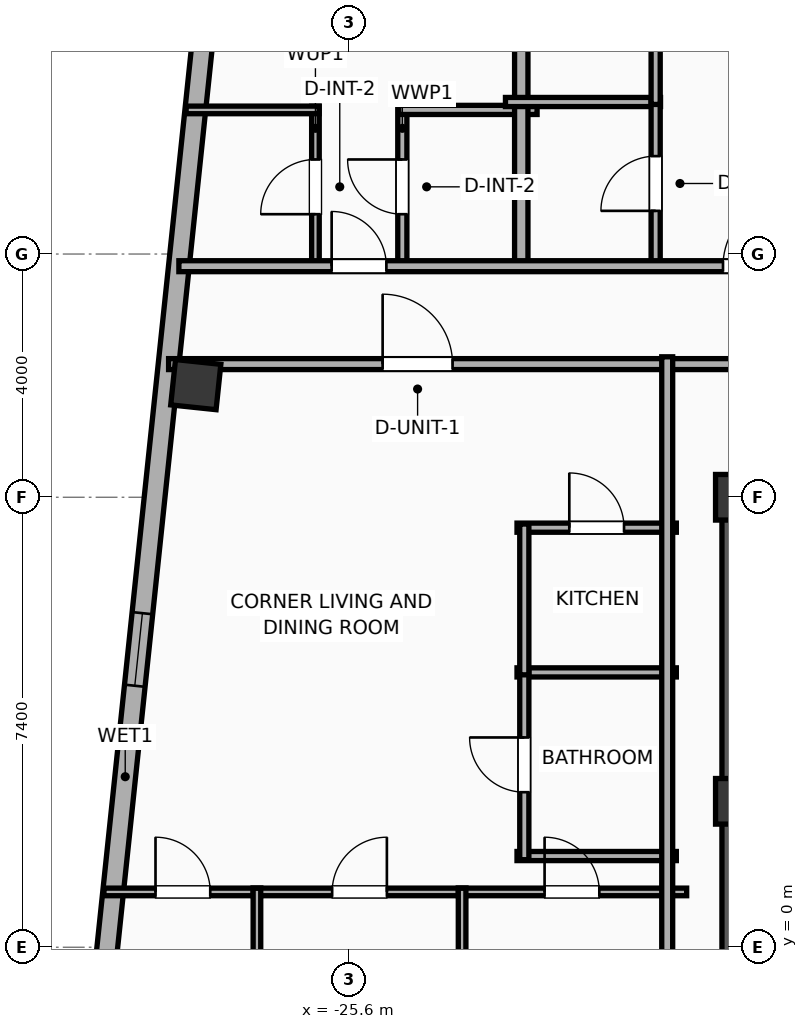
"""IFC4 building model, lengths in metres.
Left out: names, types, materials, properties, quantities, classifications, styles, units other than length and angle.
Written with IfcOpenShell. Run it as: python <this file> out.ifc"""

import sys

from ifc_helpers import new_model, si_unit, direction, frame, frame_2d, origin, origin_2d, place, context, subcontext, project, spatial, rectangle, hollow_rectangle, extrude, element, fill, save


model = new_model("IFC4")
c1 = context("Model", 3, precision=1e-05, world=origin(), true_north=direction((0.0, 1.0)))
c2 = subcontext(c1, "Body", "Model", "MODEL_VIEW")
j1 = project(units=[si_unit("LENGTHUNIT", "METRE"), si_unit("PLANEANGLEUNIT", "RADIAN")], contexts=[c1])
p1 = place(None, origin())
s1 = spatial("IfcSite", under=j1, at=p1, CompositionType="ELEMENT")
p2 = place(p1, origin())
s2 = spatial("IfcBuilding", under=s1, at=p2, CompositionType="ELEMENT")
p3 = place(p2, frame((0.0, 0.0, 287.3)))
s3 = spatial("IfcBuildingStorey", under=s2, at=p3, CompositionType="ELEMENT", Elevation=287.3)
for number, where, z_axis, x_axis in (
    (1, (-19.2, 2.4, 0.0), (0.0, 0.0, 1.0), (1.0, 0.0, 0.0)),
    (2, (-19.2, 7.4, 0.0), (0.0, 0.0, 1.0), (1.0, 0.0, 0.0)),
):
    element("IfcColumn", number, at=place(p3, frame(where, z_axis=z_axis, x_axis=x_axis)), inside=s3, PredefinedType="COLUMN", context=c2, shape_type="SweptSolid", body=[
        extrude(rectangle(XDim=0.75, YDim=0.75, at=origin_2d()), origin(), (0.0, 0.0, 1.0), 3.9),
    ])
p4 = place(p3, frame((-19.425, 7.4, 0.0), z_axis=(0.0, 0.0, 1.0), x_axis=(1.0, 0.0, 0.0)))
e3 = element("IfcWall", 3, at=p4, inside=s3, PredefinedType="SHEAR", context=c2, shape_type="SweptSolid", body=[
    extrude(rectangle(XDim=7.25, YDim=0.45, at=frame_2d((3.625, 0.0))), origin(), (0.0, 0.0, 1.0), 3.635),
])
p5 = place(p3, frame((-19.145, -7.4, 0.0), z_axis=(0.0, 0.0, 1.0), x_axis=(0.0, 1.0, 0.0)))
e4 = element("IfcWall", 4, at=p5, inside=s3, PredefinedType="SHEAR", context=c2, shape_type="SweptSolid", body=[
    extrude(rectangle(XDim=14.8, YDim=0.65, at=frame_2d((7.4, 0.0))), origin(), (0.0, 0.0, 1.0), 3.635),
])
p6 = place(p3, frame((-28.123, 9.252, 0.0), z_axis=(0.0, 0.0, 1.0), x_axis=(0.994521895368, -0.104528463268, 0.0)))
e5 = element("IfcColumn", 5, at=p6, inside=s3, PredefinedType="COLUMN", context=c2, shape_type="SweptSolid", body=[
    extrude(hollow_rectangle(XDim=0.75, YDim=0.75, WallThickness=0.025, at=origin_2d()), origin(), (0.0, 0.0, 1.0), 3.9),
])
p7 = place(p3, frame((-30.87, -12.296, 0.0), z_axis=(0.0, 0.0, 1.0), x_axis=(0.104533282919, 0.994521388791, 0.0)))
e6 = element("IfcWall", 6, at=p7, inside=s3, PredefinedType="ELEMENTEDWALL", context=c2, shape_type="SweptSolid", body=[
    extrude(rectangle(XDim=30.366, YDim=0.34, at=frame_2d((15.183, 0.0))), origin(), (0.0, 0.0, 1.0), 3.635),
])
p8 = place(p7, frame((5.842, 0.0, 0.75)))
e7 = element("IfcOpeningElement", 7, at=p8, cuts=e6, PredefinedType="OPENING", context=c2, shape_type="SweptSolid", body=[
    extrude(rectangle(XDim=1.8, YDim=2.1, at=frame_2d((0.9, 1.05))), frame((0.0, 0.18, 0.0), z_axis=(0.0, -1.0, 0.0), x_axis=(1.0, 0.0, 0.0)), (0.0, 0.0, 1.0), 0.36),
])
p9 = place(p7, frame((27.238, 0.0, 0.75)))
e8 = element("IfcOpeningElement", 8, at=p9, cuts=e6, PredefinedType="OPENING", context=c2, shape_type="SweptSolid", body=[
    extrude(rectangle(XDim=1.2, YDim=2.05, at=frame_2d((0.6, 1.025))), frame((0.0, 0.18, 0.0), z_axis=(0.0, -1.0, 0.0), x_axis=(1.0, 0.0, 0.0)), (0.0, 0.0, 1.0), 0.36),
])
p10 = place(p7, frame((16.688, 0.0, 0.75)))
e9 = element("IfcOpeningElement", 9, at=p10, cuts=e6, PredefinedType="OPENING", context=c2, shape_type="SweptSolid", body=[
    extrude(rectangle(XDim=1.2, YDim=2.05, at=frame_2d((0.6, 1.025))), frame((0.0, 0.18, 0.0), z_axis=(0.0, -1.0, 0.0), x_axis=(1.0, 0.0, 0.0)), (0.0, 0.0, 1.0), 0.36),
])
p11 = place(p3, frame((-28.57, 9.59, 0.0), z_axis=(0.0, 0.0, 1.0), x_axis=(1.0, 0.0, 0.0)))
e10 = element("IfcWall", 10, at=p11, inside=s3, PredefinedType="PARTITIONING", context=c2, shape_type="SweptSolid", body=[
    extrude(rectangle(XDim=18.69, YDim=0.18, at=frame_2d((9.345, 0.0))), origin(), (0.0, 0.0, 1.0), 3.635),
])
p12 = place(p11, frame((3.52, 0.0, 0.0)))
e11 = element("IfcOpeningElement", 11, at=p12, cuts=e10, PredefinedType="OPENING", context=c2, shape_type="SweptSolid", body=[
    extrude(rectangle(XDim=1.15, YDim=2.05, at=frame_2d((0.575, 1.025))), frame((0.0, 0.1, 0.0), z_axis=(0.0, -1.0, 0.0), x_axis=(1.0, 0.0, 0.0)), (0.0, 0.0, 1.0), 0.2),
])
p13 = place(p3, frame((-26.155, 11.18, 0.0), z_axis=(0.0, 0.0, 1.0), x_axis=(0.0, 1.0, 0.0)))
e12 = element("IfcWall", 12, at=p13, inside=s3, PredefinedType="PARTITIONING", context=c2, shape_type="SweptSolid", body=[
    extrude(rectangle(XDim=2.65, YDim=0.125, at=frame_2d((1.325, 0.0))), origin(), (0.0, 0.0, 1.0), 3.635),
])
p14 = place(p13, frame((0.875, 0.0, 0.0)))
e13 = element("IfcOpeningElement", 13, at=p14, cuts=e12, PredefinedType="OPENING", context=c2, shape_type="SweptSolid", body=[
    extrude(rectangle(XDim=0.9, YDim=2.05, at=frame_2d((0.45, 1.025))), frame((0.0, 0.073, 0.0), z_axis=(0.0, -1.0, 0.0), x_axis=(1.0, 0.0, 0.0)), (0.0, 0.0, 1.0), 0.145),
])
p15 = place(p3, frame((-24.726, 11.18, 0.0), z_axis=(0.0, 0.0, 1.0), x_axis=(0.0, 1.0, 0.0)))
e14 = element("IfcWall", 14, at=p15, inside=s3, PredefinedType="PLUMBINGWALL", context=c2, shape_type="SweptSolid", body=[
    extrude(rectangle(XDim=2.65, YDim=0.15, at=frame_2d((1.325, 0.0))), origin(), (0.0, 0.0, 1.0), 3.635),
])
p16 = place(p15, frame((0.875, 0.0, 0.0)))
e15 = element("IfcOpeningElement", 15, at=p16, cuts=e14, PredefinedType="OPENING", context=c2, shape_type="SweptSolid", body=[
    extrude(rectangle(XDim=0.9, YDim=2.05, at=frame_2d((0.45, 1.025))), frame((0.0, 0.085, 0.0), z_axis=(0.0, -1.0, 0.0), x_axis=(1.0, 0.0, 0.0)), (0.0, 0.0, 1.0), 0.17),
])
p17 = place(p3, frame((-28.281, 13.77, 0.0), z_axis=(0.0, 0.0, 1.0), x_axis=(1.0, 0.0, 0.0)))
e16 = element("IfcWall", 16, at=p17, inside=s3, PredefinedType="PARTITIONING", context=c2, shape_type="SweptSolid", body=[
    extrude(rectangle(XDim=2.186, YDim=0.125, at=frame_2d((1.093, 0.0))), origin(), (0.0, 0.0, 1.0), 3.635),
])
p18 = place(p3, frame((-24.786, 13.77, 0.0), z_axis=(0.0, 0.0, 1.0), x_axis=(1.0, 0.0, 0.0)))
e17 = element("IfcWall", 17, at=p18, inside=s3, PredefinedType="PLUMBINGWALL", context=c2, shape_type="SweptSolid", body=[
    extrude(rectangle(XDim=2.276, YDim=0.15, at=frame_2d((1.138, 0.0))), origin(), (0.0, 0.0, 1.0), 3.635),
])
p19 = place(p3, frame((-22.77, 11.12, 0.0), z_axis=(0.0, 0.0, 1.0), x_axis=(0.0, 1.0, 0.0)))
e18 = element("IfcWall", 18, at=p19, inside=s3, PredefinedType="PARTITIONING", context=c2, shape_type="SweptSolid", body=[
    extrude(rectangle(XDim=9.732, YDim=0.22, at=frame_2d((4.866, 0.0))), origin(), (0.0, 0.0, 1.0), 3.075),
])
p20 = place(p3, frame((-23.03, 13.9, 0.0), z_axis=(0.0, 0.0, 1.0), x_axis=(1.0, 0.0, 0.0)))
e19 = element("IfcWall", 19, at=p20, inside=s3, PredefinedType="PLUMBINGWALL", context=c2, shape_type="SweptSolid", body=[
    extrude(rectangle(XDim=2.55, YDim=0.15, at=frame_2d((1.275, 0.0))), origin(), (0.0, 0.0, 1.0), 3.635),
])
p21 = place(p3, frame((-20.56, 11.18, 0.0), z_axis=(0.0, 0.0, 1.0), x_axis=(0.0, 1.0, 0.0)))
e20 = element("IfcWall", 20, at=p21, inside=s3, PredefinedType="PLUMBINGWALL", context=c2, shape_type="SweptSolid", body=[
    extrude(rectangle(XDim=2.76, YDim=0.15, at=frame_2d((1.38, 0.0))), origin(), (0.0, 0.0, 1.0), 3.075),
])
p22 = place(p21, frame((0.93, 0.0, 0.0)))
e21 = element("IfcOpeningElement", 21, at=p22, cuts=e20, PredefinedType="OPENING", context=c2, shape_type="SweptSolid", body=[
    extrude(rectangle(XDim=0.9, YDim=2.05, at=frame_2d((0.45, 1.025))), frame((0.0, 0.085, 0.0), z_axis=(0.0, -1.0, 0.0), x_axis=(1.0, 0.0, 0.0)), (0.0, 0.0, 1.0), 0.17),
])
p23 = place(p3, frame((-20.56, 13.86, 0.0), z_axis=(0.0, 0.0, 1.0), x_axis=(0.0, 1.0, 0.0)))
e22 = element("IfcWall", 22, at=p23, inside=s3, PredefinedType="PLUMBINGWALL", context=c2, shape_type="SweptSolid", body=[
    extrude(rectangle(XDim=6.911, YDim=0.15, at=frame_2d((3.456, 0.0))), origin(), (0.0, 0.0, 1.0), 3.635),
])
p24 = place(p23, frame((3.006, 0.0, 0.0)))
e23 = element("IfcOpeningElement", 23, at=p24, cuts=e22, PredefinedType="OPENING", context=c2, shape_type="SweptSolid", body=[
    extrude(rectangle(XDim=0.9, YDim=2.05, at=frame_2d((0.45, 1.025))), frame((0.0, 0.085, 0.0), z_axis=(0.0, -1.0, 0.0), x_axis=(1.0, 0.0, 0.0)), (0.0, 0.0, 1.0), 0.17),
])
p25 = place(p3, frame((-28.401, 11.2, 0.0), z_axis=(0.0, 0.0, 1.0), x_axis=(1.0, 0.0, 0.0)))
e24 = element("IfcWall", 24, at=p25, inside=s3, PredefinedType="PARTITIONING", context=c2, shape_type="SweptSolid", body=[
    extrude(rectangle(XDim=53.956, YDim=0.18, at=frame_2d((26.978, 0.0))), origin(), (0.0, 0.0, 1.0), 3.635),
])
p26 = place(p25, frame((2.512, 0.0, 0.0)))
e25 = element("IfcOpeningElement", 25, at=p26, cuts=e24, PredefinedType="OPENING", context=c2, shape_type="SweptSolid", body=[
    extrude(rectangle(XDim=0.9, YDim=2.05, at=frame_2d((0.45, 1.025))), frame((0.0, 0.1, 0.0), z_axis=(0.0, -1.0, 0.0), x_axis=(1.0, 0.0, 0.0)), (0.0, 0.0, 1.0), 0.2),
])
p27 = place(p25, frame((8.948, 0.0, 0.0)))
e26 = element("IfcOpeningElement", 26, at=p27, cuts=e24, PredefinedType="OPENING", context=c2, shape_type="SweptSolid", body=[
    extrude(rectangle(XDim=1.15, YDim=2.05, at=frame_2d((0.575, 1.025))), frame((0.0, 0.1, 0.0), z_axis=(0.0, -1.0, 0.0), x_axis=(1.0, 0.0, 0.0)), (0.0, 0.0, 1.0), 0.2),
])
p28 = place(p25, frame((13.821, 0.0, 0.0)))
e27 = element("IfcOpeningElement", 27, at=p28, cuts=e24, PredefinedType="OPENING", context=c2, shape_type="SweptSolid", body=[
    extrude(rectangle(XDim=0.9, YDim=2.05, at=frame_2d((0.45, 1.025))), frame((0.0, 0.1, 0.0), z_axis=(0.0, -1.0, 0.0), x_axis=(1.0, 0.0, 0.0)), (0.0, 0.0, 1.0), 0.2),
])
p29 = place(p25, frame((20.818, 0.0, 0.0)))
e28 = element("IfcOpeningElement", 28, at=p29, cuts=e24, PredefinedType="OPENING", context=c2, shape_type="SweptSolid", body=[
    extrude(rectangle(XDim=1.15, YDim=2.05, at=frame_2d((0.575, 1.025))), frame((0.0, 0.1, 0.0), z_axis=(0.0, -1.0, 0.0), x_axis=(1.0, 0.0, 0.0)), (0.0, 0.0, 1.0), 0.2),
])
p30 = place(p25, frame((27.212, 0.0, 0.0)))
e29 = element("IfcOpeningElement", 29, at=p30, cuts=e24, PredefinedType="OPENING", context=c2, shape_type="SweptSolid", body=[
    extrude(rectangle(XDim=1.15, YDim=2.05, at=frame_2d((0.575, 1.025))), frame((0.0, 0.1, 0.0), z_axis=(0.0, -1.0, 0.0), x_axis=(1.0, 0.0, 0.0)), (0.0, 0.0, 1.0), 0.2),
])
p31 = place(p25, frame((32.576, 0.0, 0.0)))
e30 = element("IfcOpeningElement", 30, at=p31, cuts=e24, PredefinedType="OPENING", context=c2, shape_type="SweptSolid", body=[
    extrude(rectangle(XDim=0.9, YDim=2.05, at=frame_2d((0.45, 1.025))), frame((0.0, 0.1, 0.0), z_axis=(0.0, -1.0, 0.0), x_axis=(1.0, 0.0, 0.0)), (0.0, 0.0, 1.0), 0.2),
])
p32 = place(p25, frame((38.576, 0.0, 0.0)))
e31 = element("IfcOpeningElement", 31, at=p32, cuts=e24, PredefinedType="OPENING", context=c2, shape_type="SweptSolid", body=[
    extrude(rectangle(XDim=0.9, YDim=2.05, at=frame_2d((0.45, 1.025))), frame((0.0, 0.1, 0.0), z_axis=(0.0, -1.0, 0.0), x_axis=(1.0, 0.0, 0.0)), (0.0, 0.0, 1.0), 0.2),
])
p33 = place(p25, frame((43.102, 0.0, 0.0)))
e32 = element("IfcOpeningElement", 32, at=p33, cuts=e24, PredefinedType="OPENING", context=c2, shape_type="SweptSolid", body=[
    extrude(rectangle(XDim=1.15, YDim=2.05, at=frame_2d((0.575, 1.025))), frame((0.0, 0.1, 0.0), z_axis=(0.0, -1.0, 0.0), x_axis=(1.0, 0.0, 0.0)), (0.0, 0.0, 1.0), 0.2),
])
p34 = place(p25, frame((50.732, 0.0, 0.0)))
e33 = element("IfcOpeningElement", 33, at=p34, cuts=e24, PredefinedType="OPENING", context=c2, shape_type="SweptSolid", body=[
    extrude(rectangle(XDim=0.9, YDim=2.05, at=frame_2d((0.45, 1.025))), frame((0.0, 0.1, 0.0), z_axis=(0.0, -1.0, 0.0), x_axis=(1.0, 0.0, 0.0)), (0.0, 0.0, 1.0), 0.2),
])
p35 = place(p3, frame((-22.84, 6.9, 0.0), z_axis=(0.0, 0.0, 1.0), x_axis=(1.0, 0.0, 0.0)))
e34 = element("IfcWall", 34, at=p35, inside=s3, PredefinedType="PLUMBINGWALL", context=c2, shape_type="SweptSolid", body=[
    extrude(rectangle(XDim=2.62, YDim=0.15, at=frame_2d((1.31, 0.0))), origin(), (0.0, 0.0, 1.0), 3.635),
])
p36 = place(p35, frame((0.86, 0.0, 0.0)))
e35 = element("IfcOpeningElement", 35, at=p36, cuts=e34, PredefinedType="OPENING", context=c2, shape_type="SweptSolid", body=[
    extrude(rectangle(XDim=0.9, YDim=2.05, at=frame_2d((0.45, 1.025))), frame((0.0, 0.085, 0.0), z_axis=(0.0, -1.0, 0.0), x_axis=(1.0, 0.0, 0.0)), (0.0, 0.0, 1.0), 0.17),
])
for number, where, z_axis, x_axis in (
    (36, (-22.84, 4.52, 0.0), (0.0, 0.0, 1.0), (1.0, 0.0, 0.0)),
    (37, (-22.84, 1.5, 0.0), (0.0, 0.0, 1.0), (1.0, 0.0, 0.0)),
):
    element("IfcWall", number, at=place(p3, frame(where, z_axis=z_axis, x_axis=x_axis)), inside=s3, PredefinedType="PLUMBINGWALL", context=c2, shape_type="SweptSolid", body=[
        extrude(rectangle(XDim=2.62, YDim=0.15, at=frame_2d((1.31, 0.0))), origin(), (0.0, 0.0, 1.0), 3.635),
    ])
p37 = place(p3, frame((-22.72, 1.44, 0.0), z_axis=(0.0, 0.0, 1.0), x_axis=(0.0, 1.0, 0.0)))
e38 = element("IfcWall", 38, at=p37, inside=s3, PredefinedType="PLUMBINGWALL", context=c2, shape_type="SweptSolid", body=[
    extrude(rectangle(XDim=3.12, YDim=0.15, at=frame_2d((1.56, 0.0))), origin(), (0.0, 0.0, 1.0), 3.635),
])
p38 = place(p37, frame((1.11, 0.0, 0.0)))
e39 = element("IfcOpeningElement", 39, at=p38, cuts=e38, PredefinedType="OPENING", context=c2, shape_type="SweptSolid", body=[
    extrude(rectangle(XDim=0.9, YDim=2.05, at=frame_2d((0.45, 1.025))), frame((0.0, 0.085, 0.0), z_axis=(0.0, -1.0, 0.0), x_axis=(1.0, 0.0, 0.0)), (0.0, 0.0, 1.0), 0.17),
])
p39 = place(p3, frame((-22.72, 4.48, 0.0), z_axis=(0.0, 0.0, 1.0), x_axis=(0.0, 1.0, 0.0)))
e40 = element("IfcWall", 40, at=p39, inside=s3, PredefinedType="PLUMBINGWALL", context=c2, shape_type="SweptSolid", body=[
    extrude(rectangle(XDim=2.48, YDim=0.15, at=frame_2d((1.24, 0.0))), origin(), (0.0, 0.0, 1.0), 3.635),
])
p40 = place(p3, frame((-29.633, 0.91, 0.0), z_axis=(0.0, 0.0, 1.0), x_axis=(1.0, 0.0, 0.0)))
e41 = element("IfcWall", 41, at=p40, inside=s3, PredefinedType="PARTITIONING", context=c2, shape_type="SweptSolid", body=[
    extrude(rectangle(XDim=2.579, YDim=0.125, at=frame_2d((1.289, 0.0))), origin(), (0.0, 0.0, 1.0), 3.635),
])
p41 = place(p40, frame((0.848, 0.0, 0.0)))
e42 = element("IfcOpeningElement", 42, at=p41, cuts=e41, PredefinedType="OPENING", context=c2, shape_type="SweptSolid", body=[
    extrude(rectangle(XDim=0.9, YDim=2.05, at=frame_2d((0.45, 1.025))), frame((0.0, 0.073, 0.0), z_axis=(0.0, -1.0, 0.0), x_axis=(1.0, 0.0, 0.0)), (0.0, 0.0, 1.0), 0.145),
])
p42 = place(p3, frame((-27.179, 0.91, 0.0), z_axis=(0.0, 0.0, 1.0), x_axis=(1.0, 0.0, 0.0)))
e43 = element("IfcWall", 43, at=p42, inside=s3, PredefinedType="PARTITIONING", context=c2, shape_type="SweptSolid", body=[
    extrude(rectangle(XDim=3.499, YDim=0.125, at=frame_2d((1.75, 0.0))), origin(), (0.0, 0.0, 1.0), 3.635),
])
p43 = place(p42, frame((1.3, 0.0, 0.0)))
e44 = element("IfcOpeningElement", 44, at=p43, cuts=e43, PredefinedType="OPENING", context=c2, shape_type="SweptSolid", body=[
    extrude(rectangle(XDim=0.9, YDim=2.05, at=frame_2d((0.45, 1.025))), frame((0.0, 0.073, 0.0), z_axis=(0.0, -1.0, 0.0), x_axis=(1.0, 0.0, 0.0)), (0.0, 0.0, 1.0), 0.145),
])
p44 = place(p3, frame((-23.805, 0.91, 0.0), z_axis=(0.0, 0.0, 1.0), x_axis=(1.0, 0.0, 0.0)))
e45 = element("IfcWall", 45, at=p44, inside=s3, PredefinedType="PARTITIONING", context=c2, shape_type="SweptSolid", body=[
    extrude(rectangle(XDim=3.755, YDim=0.125, at=frame_2d((1.878, 0.0))), origin(), (0.0, 0.0, 1.0), 3.635),
])
p45 = place(p44, frame((1.419, 0.0, 0.0)))
e46 = element("IfcOpeningElement", 46, at=p45, cuts=e45, PredefinedType="OPENING", context=c2, shape_type="SweptSolid", body=[
    extrude(rectangle(XDim=0.9, YDim=2.05, at=frame_2d((0.45, 1.025))), frame((0.0, 0.073, 0.0), z_axis=(0.0, -1.0, 0.0), x_axis=(1.0, 0.0, 0.0)), (0.0, 0.0, 1.0), 0.145),
])
for number, where, z_axis, x_axis in (
    (47, (-23.743, -9.91, 0.0), (0.0, 0.0, 1.0), (0.0, 1.0, 0.0)),
    (48, (-27.117, -9.91, 0.0), (0.0, 0.0, 1.0), (0.0, 1.0, 0.0)),
):
    element("IfcWall", number, at=place(p3, frame(where, z_axis=z_axis, x_axis=x_axis)), inside=s3, PredefinedType="PARTITIONING", context=c2, shape_type="SweptSolid", body=[
        extrude(rectangle(XDim=10.88, YDim=0.125, at=frame_2d((5.44, 0.0))), origin(), (0.0, 0.0, 1.0), 3.635),
    ])
p46 = place(p3, frame((-20.37, -9.71, 0.0), z_axis=(0.0, 0.0, 1.0), x_axis=(0.0, 1.0, 0.0)))
e49 = element("IfcWall", 49, at=p46, inside=s3, PredefinedType="PARTITIONING", context=c2, shape_type="SweptSolid", body=[
    extrude(rectangle(XDim=19.42, YDim=0.18, at=frame_2d((9.71, 0.0))), origin(), (0.0, 0.0, 1.0), 3.635),
])
p47 = place(p10, origin())
e50 = element("IfcWindow", 50, at=p47, inside=s3, PartitioningType="SINGLE_PANEL", PredefinedType="WINDOW", context=c2, shape_type="SweptSolid", body=[
    extrude(rectangle(XDim=1.2, YDim=2.05, at=frame_2d((0.6, 1.025))), frame((0.0, 0.03, 0.0), z_axis=(0.0, -1.0, 0.0), x_axis=(1.0, 0.0, 0.0)), (0.0, 0.0, 1.0), 0.06),
])
fill(e9, e50)
p48 = place(p12, origin())
e51 = element("IfcDoor", 51, at=p48, inside=s3, OperationType="SINGLE_SWING_LEFT", PredefinedType="DOOR", context=c2, shape_type="SweptSolid", body=[
    extrude(rectangle(XDim=1.15, YDim=2.05, at=frame_2d((0.575, 1.025))), frame((0.0, 0.025, 0.0), z_axis=(0.0, -1.0, 0.0), x_axis=(1.0, 0.0, 0.0)), (0.0, 0.0, 1.0), 0.05),
])
fill(e11, e51)
p49 = place(p14, origin())
e52 = element("IfcDoor", 52, at=p49, inside=s3, OperationType="SINGLE_SWING_LEFT", PredefinedType="DOOR", context=c2, shape_type="SweptSolid", body=[
    extrude(rectangle(XDim=0.9, YDim=2.05, at=frame_2d((0.45, 1.025))), frame((0.0, 0.025, 0.0), z_axis=(0.0, -1.0, 0.0), x_axis=(1.0, 0.0, 0.0)), (0.0, 0.0, 1.0), 0.05),
])
fill(e13, e52)
p50 = place(p16, origin())
e53 = element("IfcDoor", 53, at=p50, inside=s3, OperationType="SINGLE_SWING_RIGHT", PredefinedType="DOOR", context=c2, shape_type="SweptSolid", body=[
    extrude(rectangle(XDim=0.9, YDim=2.05, at=frame_2d((0.45, 1.025))), frame((0.0, 0.025, 0.0), z_axis=(0.0, -1.0, 0.0), x_axis=(1.0, 0.0, 0.0)), (0.0, 0.0, 1.0), 0.05),
])
fill(e15, e53)
p51 = place(p22, origin())
e54 = element("IfcDoor", 54, at=p51, inside=s3, OperationType="SINGLE_SWING_LEFT", PredefinedType="DOOR", context=c2, shape_type="SweptSolid", body=[
    extrude(rectangle(XDim=0.9, YDim=2.05, at=frame_2d((0.45, 1.025))), frame((0.0, 0.025, 0.0), z_axis=(0.0, -1.0, 0.0), x_axis=(1.0, 0.0, 0.0)), (0.0, 0.0, 1.0), 0.05),
])
fill(e21, e54)
p52 = place(p26, origin())
e55 = element("IfcDoor", 55, at=p52, inside=s3, OperationType="SINGLE_SWING_LEFT", PredefinedType="DOOR", context=c2, shape_type="SweptSolid", body=[
    extrude(rectangle(XDim=0.9, YDim=2.05, at=frame_2d((0.45, 1.025))), frame((0.0, 0.025, 0.0), z_axis=(0.0, -1.0, 0.0), x_axis=(1.0, 0.0, 0.0)), (0.0, 0.0, 1.0), 0.05),
])
fill(e25, e55)
p53 = place(p27, origin())
e56 = element("IfcDoor", 56, at=p53, inside=s3, OperationType="SINGLE_SWING_RIGHT", PredefinedType="DOOR", context=c2, shape_type="SweptSolid", body=[
    extrude(rectangle(XDim=1.15, YDim=2.05, at=frame_2d((0.575, 1.025))), frame((0.0, 0.025, 0.0), z_axis=(0.0, -1.0, 0.0), x_axis=(1.0, 0.0, 0.0)), (0.0, 0.0, 1.0), 0.05),
])
fill(e26, e56)
p54 = place(p36, origin())
e57 = element("IfcDoor", 57, at=p54, inside=s3, OperationType="SINGLE_SWING_LEFT", PredefinedType="DOOR", context=c2, shape_type="SweptSolid", body=[
    extrude(rectangle(XDim=0.9, YDim=2.05, at=frame_2d((0.45, 1.025))), frame((0.0, 0.025, 0.0), z_axis=(0.0, -1.0, 0.0), x_axis=(1.0, 0.0, 0.0)), (0.0, 0.0, 1.0), 0.05),
])
fill(e35, e57)
p55 = place(p38, origin())
e58 = element("IfcDoor", 58, at=p55, inside=s3, OperationType="SINGLE_SWING_RIGHT", PredefinedType="DOOR", context=c2, shape_type="SweptSolid", body=[
    extrude(rectangle(XDim=0.9, YDim=2.05, at=frame_2d((0.45, 1.025))), frame((0.0, 0.025, 0.0), z_axis=(0.0, -1.0, 0.0), x_axis=(1.0, 0.0, 0.0)), (0.0, 0.0, 1.0), 0.05),
])
fill(e39, e58)
p56 = place(p41, origin())
e59 = element("IfcDoor", 59, at=p56, inside=s3, OperationType="SINGLE_SWING_LEFT", PredefinedType="DOOR", context=c2, shape_type="SweptSolid", body=[
    extrude(rectangle(XDim=0.9, YDim=2.05, at=frame_2d((0.45, 1.025))), frame((0.0, 0.025, 0.0), z_axis=(0.0, -1.0, 0.0), x_axis=(1.0, 0.0, 0.0)), (0.0, 0.0, 1.0), 0.05),
])
fill(e42, e59)
p57 = place(p43, origin())
e60 = element("IfcDoor", 60, at=p57, inside=s3, OperationType="SINGLE_SWING_RIGHT", PredefinedType="DOOR", context=c2, shape_type="SweptSolid", body=[
    extrude(rectangle(XDim=0.9, YDim=2.05, at=frame_2d((0.45, 1.025))), frame((0.0, 0.025, 0.0), z_axis=(0.0, -1.0, 0.0), x_axis=(1.0, 0.0, 0.0)), (0.0, 0.0, 1.0), 0.05),
])
fill(e44, e60)
p58 = place(p45, origin())
e61 = element("IfcDoor", 61, at=p58, inside=s3, OperationType="SINGLE_SWING_LEFT", PredefinedType="DOOR", context=c2, shape_type="SweptSolid", body=[
    extrude(rectangle(XDim=0.9, YDim=2.05, at=frame_2d((0.45, 1.025))), frame((0.0, 0.025, 0.0), z_axis=(0.0, -1.0, 0.0), x_axis=(1.0, 0.0, 0.0)), (0.0, 0.0, 1.0), 0.05),
])
fill(e46, e61)
save(model, sys.argv[1])
